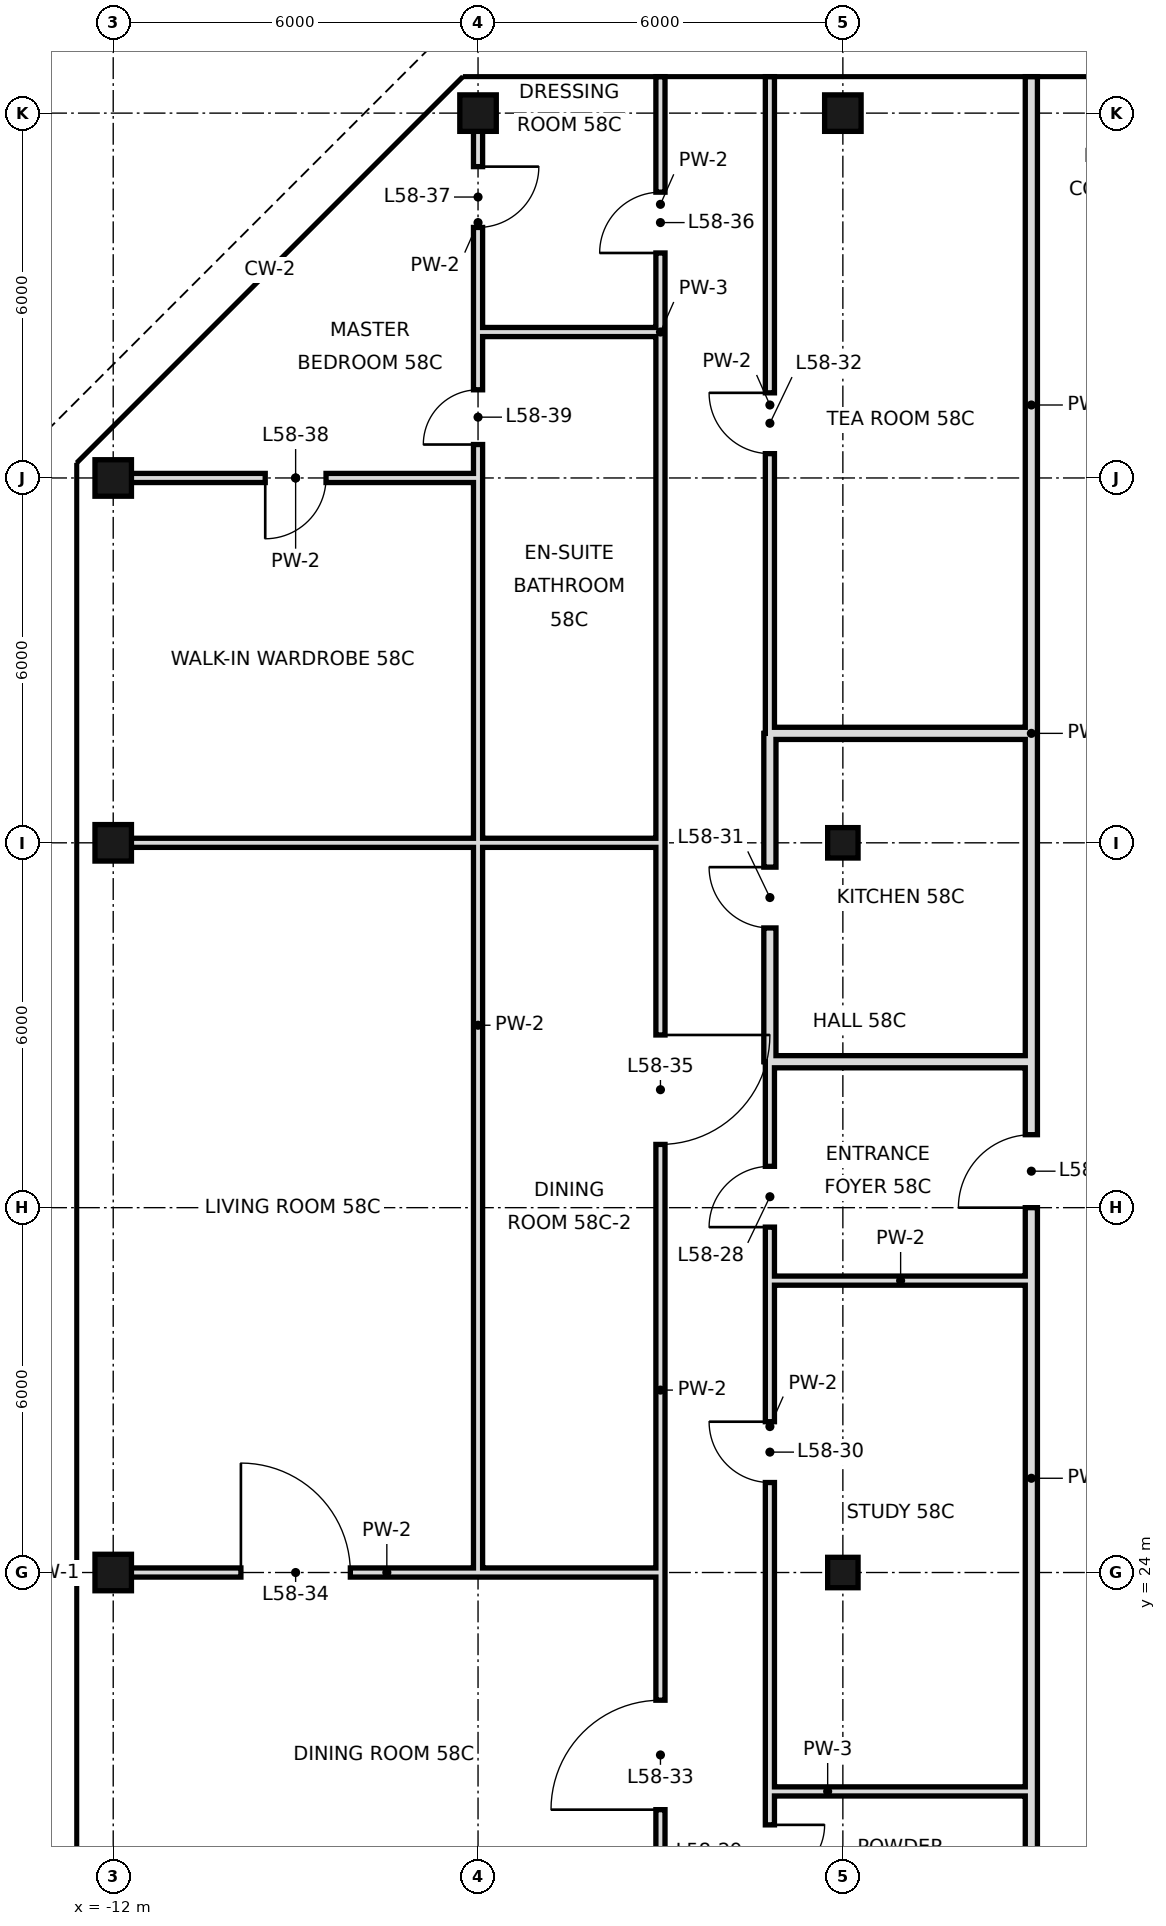
"""IFC4 building model, lengths in metres.
Left out: names, types, materials, properties, quantities, classifications, styles, units other than length and angle.
Written with IfcOpenShell. Run it as: python <this file> out.ifc"""

import sys

from ifc_helpers import new_model, si_unit, direction, frame, frame_2d, origin, origin_2d, place, context, subcontext, project, spatial, rectangle, hollow_rectangle, extrude, element, fill, save


model = new_model("IFC4")
c1 = context("Model", 3, precision=1e-05, world=origin(), true_north=direction((0.0, 1.0)))
c2 = subcontext(c1, "Body", "Model", "MODEL_VIEW")
j1 = project(units=[si_unit("LENGTHUNIT", "METRE"), si_unit("PLANEANGLEUNIT", "RADIAN")], contexts=[c1])
p1 = place(None, origin())
s1 = spatial("IfcSite", under=j1, at=p1, CompositionType="ELEMENT")
p2 = place(p1, origin())
s2 = spatial("IfcBuilding", under=s1, at=p2, CompositionType="ELEMENT")
p3 = place(p2, frame((0.0, 0.0, 246.8)))
s3 = spatial("IfcBuildingStorey", under=s2, at=p3, CompositionType="ELEMENT", Elevation=246.8)
for number, where, z_axis, x_axis in (
    (1, (-12.0, 24.0, 0.0), (0.0, 0.0, 1.0), (1.0, 0.0, 0.0)),
    (2, (-12.0, 36.0, 0.0), (0.0, 0.0, 1.0), (1.0, 0.0, 0.0)),
    (3, (-12.0, 42.0, 0.0), (0.0, 0.0, 1.0), (1.0, 0.0, 0.0)),
    (4, (-6.0, 48.0, 0.0), (0.0, 0.0, 1.0), (1.0, 0.0, 0.0)),
):
    element("IfcColumn", number, at=place(p3, frame(where, z_axis=z_axis, x_axis=x_axis)), inside=s3, PredefinedType="COLUMN", context=c2, shape_type="SweptSolid", body=[
        extrude(hollow_rectangle(XDim=0.6, YDim=0.6, WallThickness=0.028, at=origin_2d()), origin(), (0.0, 0.0, 1.0), 3.6),
    ])
for number, where, z_axis, x_axis in (
    (5, (0.0, 24.0, 0.0), (0.0, 0.0, 1.0), (1.0, 0.0, 0.0)),
    (6, (0.0, 36.0, 0.0), (0.0, 0.0, 1.0), (1.0, 0.0, 0.0)),
):
    element("IfcColumn", number, at=place(p3, frame(where, z_axis=z_axis, x_axis=x_axis)), inside=s3, PredefinedType="COLUMN", context=c2, shape_type="SweptSolid", body=[
        extrude(hollow_rectangle(XDim=0.5, YDim=0.5, WallThickness=0.025, at=origin_2d()), origin(), (0.0, 0.0, 1.0), 3.6),
    ])
p4 = place(p3, frame((0.0, 48.0, 0.0), z_axis=(0.0, 0.0, 1.0), x_axis=(1.0, 0.0, 0.0)))
e7 = element("IfcColumn", 7, at=p4, inside=s3, PredefinedType="COLUMN", context=c2, shape_type="SweptSolid", body=[
    extrude(hollow_rectangle(XDim=0.6, YDim=0.6, WallThickness=0.028, at=origin_2d()), origin(), (0.0, 0.0, 1.0), 3.6),
])
p5 = place(p3, frame((-1.2, 32.4, 0.0), z_axis=(0.0, 0.0, 1.0), x_axis=(0.0, 1.0, 0.0)))
e8 = element("IfcWall", 8, at=p5, inside=s3, PredefinedType="SOLIDWALL", context=c2, shape_type="SweptSolid", body=[
    extrude(rectangle(XDim=5.4, YDim=0.2, at=frame_2d((2.7, 0.0))), origin(), (0.0, 0.0, 1.0), 2.72),
])
p6 = place(p5, frame((2.2, 0.0, 0.0)))
e9 = element("IfcOpeningElement", 9, at=p6, cuts=e8, PredefinedType="OPENING", context=c2, shape_type="SweptSolid", body=[
    extrude(rectangle(XDim=1.0, YDim=2.4, at=frame_2d((0.5, 1.2))), frame((0.0, 0.11, 0.0), z_axis=(0.0, -1.0, 0.0), x_axis=(1.0, 0.0, 0.0)), (0.0, 0.0, 1.0), 0.22),
])
p7 = place(p3, frame((-1.2, 20.4, 0.0), z_axis=(0.0, 0.0, 1.0), x_axis=(0.0, 1.0, 0.0)))
e10 = element("IfcWall", 10, at=p7, inside=s3, PredefinedType="PARTITIONING", context=c2, shape_type="SweptSolid", body=[
    extrude(rectangle(XDim=12.0, YDim=0.15, at=frame_2d((6.0, 0.0))), origin(), (0.0, 0.0, 1.0), 3.42),
])
p8 = place(p7, frame((9.28, 0.0, 0.0)))
e11 = element("IfcOpeningElement", 11, at=p8, cuts=e10, PredefinedType="OPENING", context=c2, shape_type="SweptSolid", body=[
    extrude(rectangle(XDim=1.0, YDim=2.4, at=frame_2d((0.5, 1.2))), frame((0.0, 0.085, 0.0), z_axis=(0.0, -1.0, 0.0), x_axis=(1.0, 0.0, 0.0)), (0.0, 0.0, 1.0), 0.17),
])
p9 = place(p7, frame((5.08, 0.0, 0.0)))
e12 = element("IfcOpeningElement", 12, at=p9, cuts=e10, PredefinedType="OPENING", context=c2, shape_type="SweptSolid", body=[
    extrude(rectangle(XDim=1.0, YDim=2.4, at=frame_2d((0.5, 1.2))), frame((0.0, 0.085, 0.0), z_axis=(0.0, -1.0, 0.0), x_axis=(1.0, 0.0, 0.0)), (0.0, 0.0, 1.0), 0.17),
])
p10 = place(p3, frame((-1.2, 37.8, 0.0), z_axis=(0.0, 0.0, 1.0), x_axis=(0.0, 1.0, 0.0)))
e13 = element("IfcWall", 13, at=p10, inside=s3, PredefinedType="PARTITIONING", context=c2, shape_type="SweptSolid", body=[
    extrude(rectangle(XDim=10.8, YDim=0.15, at=frame_2d((5.4, 0.0))), origin(), (0.0, 0.0, 1.0), 3.42),
])
p11 = place(p10, frame((4.6, 0.0, 0.0)))
e14 = element("IfcOpeningElement", 14, at=p11, cuts=e13, PredefinedType="OPENING", context=c2, shape_type="SweptSolid", body=[
    extrude(rectangle(XDim=1.0, YDim=2.4, at=frame_2d((0.5, 1.2))), frame((0.0, 0.085, 0.0), z_axis=(0.0, -1.0, 0.0), x_axis=(1.0, 0.0, 0.0)), (0.0, 0.0, 1.0), 0.17),
])
p12 = place(p3, frame((-1.2, 18.0, 0.0), z_axis=(0.0, 0.0, 1.0), x_axis=(0.0, 1.0, 0.0)))
e15 = element("IfcWall", 15, at=p12, inside=s3, PredefinedType="PARTITIONING", context=c2, shape_type="SweptSolid", body=[
    extrude(rectangle(XDim=2.4, YDim=0.15, at=frame_2d((1.2, 0.0))), origin(), (0.0, 0.0, 1.0), 3.42),
])
p13 = place(p12, frame((0.95, 0.0, 0.0)))
e16 = element("IfcOpeningElement", 16, at=p13, cuts=e15, PredefinedType="OPENING", context=c2, shape_type="SweptSolid", body=[
    extrude(rectangle(XDim=0.9, YDim=2.4, at=frame_2d((0.45, 1.2))), frame((0.0, 0.085, 0.0), z_axis=(0.0, -1.0, 0.0), x_axis=(1.0, 0.0, 0.0)), (0.0, 0.0, 1.0), 0.17),
])
p14 = place(p3, frame((-3.0, 18.0, 0.0), z_axis=(0.0, 0.0, 1.0), x_axis=(0.0, 1.0, 0.0)))
e17 = element("IfcWall", 17, at=p14, inside=s3, PredefinedType="PARTITIONING", context=c2, shape_type="SweptSolid", body=[
    extrude(rectangle(XDim=18.0, YDim=0.15, at=frame_2d((9.0, 0.0))), origin(), (0.0, 0.0, 1.0), 3.42),
])
p15 = place(p14, frame((2.1, 0.0, 0.0)))
e18 = element("IfcOpeningElement", 18, at=p15, cuts=e17, PredefinedType="OPENING", context=c2, shape_type="SweptSolid", body=[
    extrude(rectangle(XDim=1.8, YDim=2.4, at=frame_2d((0.9, 1.2))), frame((0.0, 0.085, 0.0), z_axis=(0.0, -1.0, 0.0), x_axis=(1.0, 0.0, 0.0)), (0.0, 0.0, 1.0), 0.17),
])
p16 = place(p14, frame((13.04, 0.0, 0.0)))
e19 = element("IfcOpeningElement", 19, at=p16, cuts=e17, PredefinedType="OPENING", context=c2, shape_type="SweptSolid", body=[
    extrude(rectangle(XDim=1.8, YDim=2.4, at=frame_2d((0.9, 1.2))), frame((0.0, 0.085, 0.0), z_axis=(0.0, -1.0, 0.0), x_axis=(1.0, 0.0, 0.0)), (0.0, 0.0, 1.0), 0.17),
])
p17 = place(p3, frame((-3.0, 44.4, 0.0), z_axis=(0.0, 0.0, 1.0), x_axis=(0.0, 1.0, 0.0)))
e20 = element("IfcWall", 20, at=p17, inside=s3, PredefinedType="PARTITIONING", context=c2, shape_type="SweptSolid", body=[
    extrude(rectangle(XDim=4.2, YDim=0.15, at=frame_2d((2.1, 0.0))), origin(), (0.0, 0.0, 1.0), 3.42),
])
p18 = place(p17, frame((1.3, 0.0, 0.0)))
e21 = element("IfcOpeningElement", 21, at=p18, cuts=e20, PredefinedType="OPENING", context=c2, shape_type="SweptSolid", body=[
    extrude(rectangle(XDim=1.0, YDim=2.4, at=frame_2d((0.5, 1.2))), frame((0.0, 0.085, 0.0), z_axis=(0.0, -1.0, 0.0), x_axis=(1.0, 0.0, 0.0)), (0.0, 0.0, 1.0), 0.17),
])
p19 = place(p3, frame((-3.0, 36.0, 0.0), z_axis=(0.0, 0.0, 1.0), x_axis=(0.0, 1.0, 0.0)))
e22 = element("IfcWall", 22, at=p19, inside=s3, PredefinedType="PARTITIONING", context=c2, shape_type="SweptSolid", body=[
    extrude(rectangle(XDim=8.4, YDim=0.15, at=frame_2d((4.2, 0.0))), origin(), (0.0, 0.0, 1.0), 3.42),
])
p20 = place(p3, frame((-6.0, 24.0, 0.0), z_axis=(0.0, 0.0, 1.0), x_axis=(0.0, 1.0, 0.0)))
e23 = element("IfcWall", 23, at=p20, inside=s3, PredefinedType="PARTITIONING", context=c2, shape_type="SweptSolid", body=[
    extrude(rectangle(XDim=12.0, YDim=0.15, at=frame_2d((6.0, 0.0))), origin(), (0.0, 0.0, 1.0), 3.42),
])
p21 = place(p3, frame((-6.0, 44.4, 0.0), z_axis=(0.0, 0.0, 1.0), x_axis=(0.0, 1.0, 0.0)))
e24 = element("IfcWall", 24, at=p21, inside=s3, PredefinedType="PARTITIONING", context=c2, shape_type="SweptSolid", body=[
    extrude(rectangle(XDim=3.6, YDim=0.15, at=frame_2d((1.8, 0.0))), origin(), (0.0, 0.0, 1.0), 3.42),
])
p22 = place(p21, frame((1.72, 0.0, 0.0)))
e25 = element("IfcOpeningElement", 25, at=p22, cuts=e24, PredefinedType="OPENING", context=c2, shape_type="SweptSolid", body=[
    extrude(rectangle(XDim=1.0, YDim=2.4, at=frame_2d((0.5, 1.2))), frame((0.0, 0.085, 0.0), z_axis=(0.0, -1.0, 0.0), x_axis=(1.0, 0.0, 0.0)), (0.0, 0.0, 1.0), 0.17),
])
p23 = place(p3, frame((-6.0, 36.0, 0.0), z_axis=(0.0, 0.0, 1.0), x_axis=(0.0, 1.0, 0.0)))
e26 = element("IfcWall", 26, at=p23, inside=s3, PredefinedType="PARTITIONING", context=c2, shape_type="SweptSolid", body=[
    extrude(rectangle(XDim=8.4, YDim=0.15, at=frame_2d((4.2, 0.0))), origin(), (0.0, 0.0, 1.0), 3.42),
])
p24 = place(p23, frame((6.55, 0.0, 0.0)))
e27 = element("IfcOpeningElement", 27, at=p24, cuts=e26, PredefinedType="OPENING", context=c2, shape_type="SweptSolid", body=[
    extrude(rectangle(XDim=0.9, YDim=2.4, at=frame_2d((0.45, 1.2))), frame((0.0, 0.085, 0.0), z_axis=(0.0, -1.0, 0.0), x_axis=(1.0, 0.0, 0.0)), (0.0, 0.0, 1.0), 0.17),
])
p25 = place(p3, frame((3.1, 18.7, 0.0), z_axis=(0.0, 0.0, 1.0), x_axis=(0.0, 1.0, 0.0)))
e28 = element("IfcWall", 28, at=p25, inside=s3, PredefinedType="SOLIDWALL", context=c2, shape_type="SweptSolid", body=[
    extrude(rectangle(XDim=13.7, YDim=0.2, at=frame_2d((6.85, 0.0))), origin(), (0.0, 0.0, 1.0), 2.97),
])
p26 = place(p25, frame((11.3, 0.0, 0.0)))
e29 = element("IfcOpeningElement", 29, at=p26, cuts=e28, PredefinedType="OPENING", context=c2, shape_type="SweptSolid", body=[
    extrude(rectangle(XDim=1.2, YDim=2.4, at=frame_2d((0.6, 1.2))), frame((0.0, 0.11, 0.0), z_axis=(0.0, -1.0, 0.0), x_axis=(1.0, 0.0, 0.0)), (0.0, 0.0, 1.0), 0.22),
])
p27 = place(p3, frame((3.1, 37.8, 0.0), z_axis=(0.0, 0.0, 1.0), x_axis=(0.0, 1.0, 0.0)))
e30 = element("IfcWall", 30, at=p27, inside=s3, PredefinedType="SOLIDWALL", context=c2, shape_type="SweptSolid", body=[
    extrude(rectangle(XDim=10.8, YDim=0.2, at=frame_2d((5.4, 0.0))), origin(), (0.0, 0.0, 1.0), 2.72),
])
p28 = place(p3, frame((3.1, 32.4, 0.0), z_axis=(0.0, 0.0, 1.0), x_axis=(0.0, 1.0, 0.0)))
e31 = element("IfcWall", 31, at=p28, inside=s3, PredefinedType="SOLIDWALL", context=c2, shape_type="SweptSolid", body=[
    extrude(rectangle(XDim=5.4, YDim=0.2, at=frame_2d((2.7, 0.0))), origin(), (0.0, 0.0, 1.0), 3.42),
])
p29 = place(p3, frame((-1.2, 20.4, 0.0), z_axis=(0.0, 0.0, 1.0), x_axis=(1.0, 0.0, 0.0)))
e32 = element("IfcWall", 32, at=p29, inside=s3, PredefinedType="PARTITIONING", context=c2, shape_type="SweptSolid", body=[
    extrude(rectangle(XDim=4.3, YDim=0.15, at=frame_2d((2.15, 0.0))), origin(), (0.0, 0.0, 1.0), 3.42),
])
p30 = place(p3, frame((-12.0, 24.0, 0.0), z_axis=(0.0, 0.0, 1.0), x_axis=(1.0, 0.0, 0.0)))
e33 = element("IfcWall", 33, at=p30, inside=s3, PredefinedType="PARTITIONING", context=c2, shape_type="SweptSolid", body=[
    extrude(rectangle(XDim=9.0, YDim=0.15, at=frame_2d((4.5, 0.0))), origin(), (0.0, 0.0, 1.0), 2.72),
])
p31 = place(p30, frame((2.1, 0.0, 0.0)))
e34 = element("IfcOpeningElement", 34, at=p31, cuts=e33, PredefinedType="OPENING", context=c2, shape_type="SweptSolid", body=[
    extrude(rectangle(XDim=1.8, YDim=2.4, at=frame_2d((0.9, 1.2))), frame((0.0, 0.085, 0.0), z_axis=(0.0, -1.0, 0.0), x_axis=(1.0, 0.0, 0.0)), (0.0, 0.0, 1.0), 0.17),
])
p32 = place(p3, frame((-1.2, 28.8, 0.0), z_axis=(0.0, 0.0, 1.0), x_axis=(1.0, 0.0, 0.0)))
e35 = element("IfcWall", 35, at=p32, inside=s3, PredefinedType="PARTITIONING", context=c2, shape_type="SweptSolid", body=[
    extrude(rectangle(XDim=4.3, YDim=0.15, at=frame_2d((2.15, 0.0))), origin(), (0.0, 0.0, 1.0), 3.42),
])
p33 = place(p3, frame((-1.2, 32.4, 0.0), z_axis=(0.0, 0.0, 1.0), x_axis=(1.0, 0.0, 0.0)))
e36 = element("IfcWall", 36, at=p33, inside=s3, PredefinedType="SOLIDWALL", context=c2, shape_type="SweptSolid", body=[
    extrude(rectangle(XDim=4.3, YDim=0.2, at=frame_2d((2.15, 0.0))), origin(), (0.0, 0.0, 1.0), 2.72),
])
p34 = place(p3, frame((-12.0, 36.0, 0.0), z_axis=(0.0, 0.0, 1.0), x_axis=(1.0, 0.0, 0.0)))
e37 = element("IfcWall", 37, at=p34, inside=s3, PredefinedType="PARTITIONING", context=c2, shape_type="SweptSolid", body=[
    extrude(rectangle(XDim=6.0, YDim=0.15, at=frame_2d((3.0, 0.0))), origin(), (0.0, 0.0, 1.0), 2.72),
])
p35 = place(p3, frame((-6.0, 36.0, 0.0), z_axis=(0.0, 0.0, 1.0), x_axis=(1.0, 0.0, 0.0)))
e38 = element("IfcWall", 38, at=p35, inside=s3, PredefinedType="PARTITIONING", context=c2, shape_type="SweptSolid", body=[
    extrude(rectangle(XDim=3.0, YDim=0.15, at=frame_2d((1.5, 0.0))), origin(), (0.0, 0.0, 1.0), 2.72),
])
p36 = place(p3, frame((-1.2, 37.8, 0.0), z_axis=(0.0, 0.0, 1.0), x_axis=(1.0, 0.0, 0.0)))
e39 = element("IfcWall", 39, at=p36, inside=s3, PredefinedType="SOLIDWALL", context=c2, shape_type="SweptSolid", body=[
    extrude(rectangle(XDim=4.3, YDim=0.2, at=frame_2d((2.15, 0.0))), origin(), (0.0, 0.0, 1.0), 2.72),
])
p37 = place(p3, frame((-12.0, 42.0, 0.0), z_axis=(0.0, 0.0, 1.0), x_axis=(1.0, 0.0, 0.0)))
e40 = element("IfcWall", 40, at=p37, inside=s3, PredefinedType="PARTITIONING", context=c2, shape_type="SweptSolid", body=[
    extrude(rectangle(XDim=6.0, YDim=0.15, at=frame_2d((3.0, 0.0))), origin(), (0.0, 0.0, 1.0), 2.72),
])
p38 = place(p37, frame((2.5, 0.0, 0.0)))
e41 = element("IfcOpeningElement", 41, at=p38, cuts=e40, PredefinedType="OPENING", context=c2, shape_type="SweptSolid", body=[
    extrude(rectangle(XDim=1.0, YDim=2.4, at=frame_2d((0.5, 1.2))), frame((0.0, 0.085, 0.0), z_axis=(0.0, -1.0, 0.0), x_axis=(1.0, 0.0, 0.0)), (0.0, 0.0, 1.0), 0.17),
])
p39 = place(p3, frame((-6.0, 44.4, 0.0), z_axis=(0.0, 0.0, 1.0), x_axis=(1.0, 0.0, 0.0)))
e42 = element("IfcWall", 42, at=p39, inside=s3, PredefinedType="PARTITIONING", context=c2, shape_type="SweptSolid", body=[
    extrude(rectangle(XDim=3.0, YDim=0.15, at=frame_2d((1.5, 0.0))), origin(), (0.0, 0.0, 1.0), 3.42),
])
p40 = place(p8, origin())
e43 = element("IfcDoor", 43, at=p40, inside=s3, OperationType="SINGLE_SWING_LEFT", PredefinedType="DOOR", context=c2, shape_type="SweptSolid", body=[
    extrude(rectangle(XDim=1.0, YDim=2.4, at=frame_2d((0.5, 1.2))), frame((0.0, 0.025, 0.0), z_axis=(0.0, -1.0, 0.0), x_axis=(1.0, 0.0, 0.0)), (0.0, 0.0, 1.0), 0.05),
])
fill(e11, e43)
p41 = place(p13, origin())
e44 = element("IfcDoor", 44, at=p41, inside=s3, OperationType="SINGLE_SWING_RIGHT", PredefinedType="DOOR", context=c2, shape_type="SweptSolid", body=[
    extrude(rectangle(XDim=0.9, YDim=2.4, at=frame_2d((0.45, 1.2))), frame((0.0, 0.025, 0.0), z_axis=(0.0, -1.0, 0.0), x_axis=(1.0, 0.0, 0.0)), (0.0, 0.0, 1.0), 0.05),
])
fill(e16, e44)
p42 = place(p9, frame((1.0, 0.0, 0.0), z_axis=(0.0, 0.0, 1.0), x_axis=(-1.0, 0.0, 0.0)))
e45 = element("IfcDoor", 45, at=p42, inside=s3, OperationType="SINGLE_SWING_LEFT", PredefinedType="DOOR", context=c2, shape_type="SweptSolid", body=[
    extrude(rectangle(XDim=1.0, YDim=2.4, at=frame_2d((0.5, 1.2))), frame((0.0, 0.025, 0.0), z_axis=(0.0, -1.0, 0.0), x_axis=(1.0, 0.0, 0.0)), (0.0, 0.0, 1.0), 0.05),
])
fill(e12, e45)
p43 = place(p6, frame((1.0, 0.0, 0.0), z_axis=(0.0, 0.0, 1.0), x_axis=(-1.0, 0.0, 0.0)))
e46 = element("IfcDoor", 46, at=p43, inside=s3, OperationType="SINGLE_SWING_LEFT", PredefinedType="DOOR", context=c2, shape_type="SweptSolid", body=[
    extrude(rectangle(XDim=1.0, YDim=2.4, at=frame_2d((0.5, 1.2))), frame((0.0, 0.025, 0.0), z_axis=(0.0, -1.0, 0.0), x_axis=(1.0, 0.0, 0.0)), (0.0, 0.0, 1.0), 0.05),
])
fill(e9, e46)
p44 = place(p11, frame((1.0, 0.0, 0.0), z_axis=(0.0, 0.0, 1.0), x_axis=(-1.0, 0.0, 0.0)))
e47 = element("IfcDoor", 47, at=p44, inside=s3, OperationType="SINGLE_SWING_LEFT", PredefinedType="DOOR", context=c2, shape_type="SweptSolid", body=[
    extrude(rectangle(XDim=1.0, YDim=2.4, at=frame_2d((0.5, 1.2))), frame((0.0, 0.025, 0.0), z_axis=(0.0, -1.0, 0.0), x_axis=(1.0, 0.0, 0.0)), (0.0, 0.0, 1.0), 0.05),
])
fill(e14, e47)
p45 = place(p15, origin())
e48 = element("IfcDoor", 48, at=p45, inside=s3, OperationType="SINGLE_SWING_LEFT", PredefinedType="DOOR", context=c2, shape_type="SweptSolid", body=[
    extrude(rectangle(XDim=1.8, YDim=2.4, at=frame_2d((0.9, 1.2))), frame((0.0, 0.025, 0.0), z_axis=(0.0, -1.0, 0.0), x_axis=(1.0, 0.0, 0.0)), (0.0, 0.0, 1.0), 0.05),
])
fill(e18, e48)
p46 = place(p31, origin())
e49 = element("IfcDoor", 49, at=p46, inside=s3, OperationType="SINGLE_SWING_LEFT", PredefinedType="DOOR", context=c2, shape_type="SweptSolid", body=[
    extrude(rectangle(XDim=1.8, YDim=2.4, at=frame_2d((0.9, 1.2))), frame((0.0, 0.025, 0.0), z_axis=(0.0, -1.0, 0.0), x_axis=(1.0, 0.0, 0.0)), (0.0, 0.0, 1.0), 0.05),
])
fill(e34, e49)
p47 = place(p16, origin())
e50 = element("IfcDoor", 50, at=p47, inside=s3, OperationType="SINGLE_SWING_RIGHT", PredefinedType="DOOR", context=c2, shape_type="SweptSolid", body=[
    extrude(rectangle(XDim=1.8, YDim=2.4, at=frame_2d((0.9, 1.2))), frame((0.0, 0.025, 0.0), z_axis=(0.0, -1.0, 0.0), x_axis=(1.0, 0.0, 0.0)), (0.0, 0.0, 1.0), 0.05),
])
fill(e19, e50)
p48 = place(p18, origin())
e51 = element("IfcDoor", 51, at=p48, inside=s3, OperationType="SINGLE_SWING_LEFT", PredefinedType="DOOR", context=c2, shape_type="SweptSolid", body=[
    extrude(rectangle(XDim=1.0, YDim=2.4, at=frame_2d((0.5, 1.2))), frame((0.0, 0.025, 0.0), z_axis=(0.0, -1.0, 0.0), x_axis=(1.0, 0.0, 0.0)), (0.0, 0.0, 1.0), 0.05),
])
fill(e21, e51)
p49 = place(p22, origin())
e52 = element("IfcDoor", 52, at=p49, inside=s3, OperationType="SINGLE_SWING_RIGHT", PredefinedType="DOOR", context=c2, shape_type="SweptSolid", body=[
    extrude(rectangle(XDim=1.0, YDim=2.4, at=frame_2d((0.5, 1.2))), frame((0.0, 0.025, 0.0), z_axis=(0.0, -1.0, 0.0), x_axis=(1.0, 0.0, 0.0)), (0.0, 0.0, 1.0), 0.05),
])
fill(e25, e52)
p50 = place(p38, frame((1.0, 0.0, 0.0), z_axis=(0.0, 0.0, 1.0), x_axis=(-1.0, 0.0, 0.0)))
e53 = element("IfcDoor", 53, at=p50, inside=s3, OperationType="SINGLE_SWING_RIGHT", PredefinedType="DOOR", context=c2, shape_type="SweptSolid", body=[
    extrude(rectangle(XDim=1.0, YDim=2.4, at=frame_2d((0.5, 1.2))), frame((0.0, 0.025, 0.0), z_axis=(0.0, -1.0, 0.0), x_axis=(1.0, 0.0, 0.0)), (0.0, 0.0, 1.0), 0.05),
])
fill(e41, e53)
p51 = place(p24, origin())
e54 = element("IfcDoor", 54, at=p51, inside=s3, OperationType="SINGLE_SWING_LEFT", PredefinedType="DOOR", context=c2, shape_type="SweptSolid", body=[
    extrude(rectangle(XDim=0.9, YDim=2.4, at=frame_2d((0.45, 1.2))), frame((0.0, 0.025, 0.0), z_axis=(0.0, -1.0, 0.0), x_axis=(1.0, 0.0, 0.0)), (0.0, 0.0, 1.0), 0.05),
])
fill(e27, e54)
p52 = place(p26, origin())
e55 = element("IfcDoor", 55, at=p52, inside=s3, OperationType="SINGLE_SWING_LEFT", PredefinedType="DOOR", context=c2, shape_type="SweptSolid", body=[
    extrude(rectangle(XDim=1.2, YDim=2.4, at=frame_2d((0.6, 1.2))), frame((0.0, 0.025, 0.0), z_axis=(0.0, -1.0, 0.0), x_axis=(1.0, 0.0, 0.0)), (0.0, 0.0, 1.0), 0.05),
])
fill(e29, e55)
save(model, sys.argv[1])
